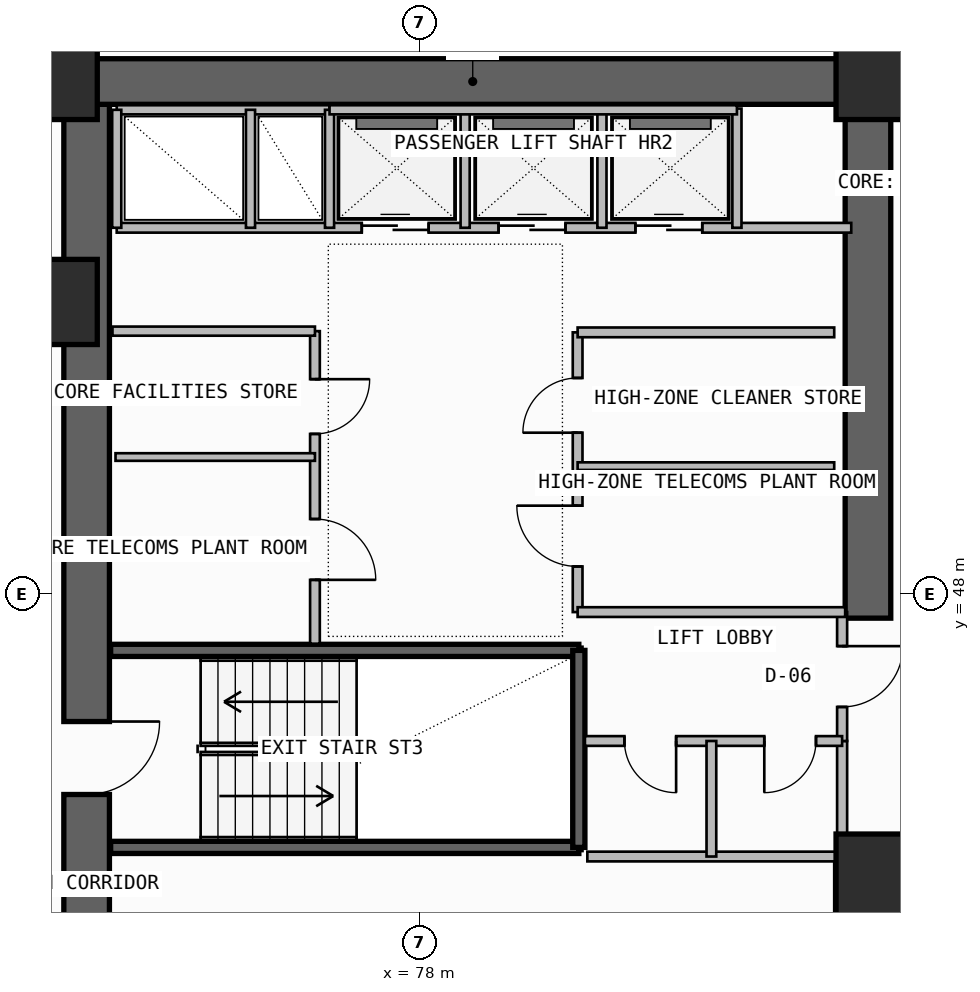
"""IFC4 building model, lengths in metres.
Left out: names, types, materials, properties, quantities, classifications, styles, units other than length and angle.
Written with IfcOpenShell. Run it as: python <this file> out.ifc"""

import sys

from ifc_helpers import new_model, si_unit, direction, frame, frame_2d, origin, origin_2d, place, context, subcontext, project, spatial, rectangle, extrude, element, fill, save


model = new_model("IFC4")
c1 = context("Model", 3, precision=1e-05, world=origin(), true_north=direction((0.0, 1.0)))
c2 = subcontext(c1, "Body", "Model", "MODEL_VIEW")
j1 = project(units=[si_unit("LENGTHUNIT", "METRE"), si_unit("PLANEANGLEUNIT", "RADIAN")], contexts=[c1])
p1 = place(None, origin())
s1 = spatial("IfcSite", under=j1, at=p1, CompositionType="ELEMENT")
p2 = place(p1, origin())
s2 = spatial("IfcBuilding", under=s1, at=p2, CompositionType="ELEMENT")
p3 = place(p2, frame((0.0, 0.0, 218.5)))
s3 = spatial("IfcBuildingStorey", under=s2, at=p3, CompositionType="ELEMENT", Elevation=218.5)
p4 = place(p3, frame((72.525, 35.5, -0.26), z_axis=(0.0, 0.0, 1.0), x_axis=(0.0, 1.0, 0.0)))
e1 = element("IfcWall", 1, at=p4, inside=s3, PredefinedType="SHEAR", context=c2, shape_type="SweptSolid", body=[
    extrude(rectangle(XDim=7.85, YDim=0.75, at=frame_2d((3.925, 0.0))), origin(), (0.0, 0.0, 1.0), 3.52),
])
p5 = place(p4, frame((1.45, 0.0, 0.26)))
e2 = element("IfcOpeningElement", 2, at=p5, cuts=e1, PredefinedType="OPENING", context=c2, shape_type="SweptSolid", body=[
    extrude(rectangle(XDim=1.2, YDim=2.2, at=frame_2d((0.6, 1.1))), frame((0.0, 0.385, 0.0), z_axis=(0.0, -1.0, 0.0), x_axis=(1.0, 0.0, 0.0)), (0.0, 0.0, 1.0), 0.77),
])
p6 = place(p3, frame((72.525, 43.35, -0.26), z_axis=(0.0, 0.0, 1.0), x_axis=(0.0, 1.0, 0.0)))
e3 = element("IfcWall", 3, at=p6, inside=s3, PredefinedType="SHEAR", context=c2, shape_type="SweptSolid", body=[
    extrude(rectangle(XDim=12.7, YDim=0.75, at=frame_2d((6.35, 0.0))), origin(), (0.0, 0.0, 1.0), 3.52),
])
p7 = place(p6, frame((1.35, 0.0, 0.26)))
e4 = element("IfcOpeningElement", 4, at=p7, cuts=e3, PredefinedType="OPENING", context=c2, shape_type="SweptSolid", body=[
    extrude(rectangle(XDim=1.2, YDim=2.2, at=frame_2d((0.6, 1.1))), frame((0.0, 0.385, 0.0), z_axis=(0.0, -1.0, 0.0), x_axis=(1.0, 0.0, 0.0)), (0.0, 0.0, 1.0), 0.77),
])
p8 = place(p3, frame((72.0, 56.425, -0.26), z_axis=(0.0, 0.0, 1.0), x_axis=(1.0, 0.0, 0.0)))
e5 = element("IfcWall", 5, at=p8, inside=s3, PredefinedType="SHEAR", context=c2, shape_type="SweptSolid", body=[
    extrude(rectangle(XDim=13.75, YDim=0.75, at=frame_2d((6.875, 0.0))), origin(), (0.0, 0.0, 1.0), 3.52),
])
p9 = place(p3, frame((85.375, 47.6, -0.26), z_axis=(0.0, 0.0, 1.0), x_axis=(0.0, 1.0, 0.0)))
e6 = element("IfcWall", 6, at=p9, inside=s3, PredefinedType="SHEAR", context=c2, shape_type="SweptSolid", body=[
    extrude(rectangle(XDim=8.45, YDim=0.75, at=frame_2d((4.225, 0.0))), origin(), (0.0, 0.0, 1.0), 3.52),
])
for number, where, z_axis, x_axis in (
    (7, (85.55, 43.35, 0.0), (0.0, 0.0, 1.0), (1.0, 0.0, 0.0)),
    (8, (72.0, 52.8, 0.0), (0.0, 0.0, 1.0), (1.0, 0.0, 0.0)),
    (9, (72.0, 56.5, 0.0), (0.0, 0.0, 1.0), (1.0, 0.0, 0.0)),
    (10, (85.55, 56.5, 0.0), (0.0, 0.0, 1.0), (1.0, 0.0, 0.0)),
):
    element("IfcColumn", number, at=place(p3, frame(where, z_axis=z_axis, x_axis=x_axis)), inside=s3, PredefinedType="COLUMN", context=c2, shape_type="SweptSolid", body=[
        extrude(rectangle(XDim=1.4, YDim=1.4, at=origin_2d()), origin(), (0.0, 0.0, 1.0), 3.52),
    ])
p10 = place(p3, frame((116.396, 56.722, 0.0), z_axis=(0.0, 0.0, 1.0), x_axis=(-0.977936620644, 0.208901809478, 0.0)))
e11 = element("IfcWall", 11, at=p10, inside=s3, PredefinedType="PARAPET", context=c2, shape_type="SweptSolid", body=[
    extrude(rectangle(XDim=31.685, YDim=0.2, at=frame_2d((15.843, 0.0))), origin(), (0.0, 0.0, 1.0), 1.15),
])
p11 = place(p3, frame((84.92, 38.85, 0.0), z_axis=(0.0, 0.0, 1.0), x_axis=(0.0, 1.0, 0.0)))
e12 = element("IfcWall", 12, at=p11, inside=s3, PredefinedType="SOLIDWALL", context=c2, shape_type="SweptSolid", body=[
    extrude(rectangle(XDim=4.83, YDim=0.2, at=frame_2d((2.415, 0.0))), origin(), (0.0, 0.0, 1.0), 3.26),
])
p12 = place(p11, frame((1.25, 0.0, 0.0)))
e13 = element("IfcOpeningElement", 13, at=p12, cuts=e12, PredefinedType="OPENING", context=c2, shape_type="SweptSolid", body=[
    extrude(rectangle(XDim=1.1, YDim=2.2, at=frame_2d((0.55, 1.1))), frame((0.0, 0.11, 0.0), z_axis=(0.0, -1.0, 0.0), x_axis=(1.0, 0.0, 0.0)), (0.0, 0.0, 1.0), 0.22),
])
for number, where, z_axis, x_axis in (
    (14, (72.92, 43.83, -0.26), (0.0, 0.0, 1.0), (1.0, 0.0, 0.0)),
    (15, (72.92, 47.07, -0.26), (0.0, 0.0, 1.0), (1.0, 0.0, 0.0)),
):
    element("IfcWall", number, at=place(p3, frame(where, z_axis=z_axis, x_axis=x_axis)), inside=s3, PredefinedType="SOLIDWALL", context=c2, shape_type="SweptSolid", body=[
        extrude(rectangle(XDim=7.7, YDim=0.2, at=frame_2d((3.85, 0.0))), origin(), (0.0, 0.0, 1.0), 3.52),
    ])
p13 = place(p3, frame((80.62, 43.83, -0.26), z_axis=(0.0, 0.0, 1.0), x_axis=(0.0, 1.0, 0.0)))
e16 = element("IfcWall", 16, at=p13, inside=s3, PredefinedType="SOLIDWALL", context=c2, shape_type="SweptSolid", body=[
    extrude(rectangle(XDim=3.24, YDim=0.2, at=frame_2d((1.62, 0.0))), origin(), (0.0, 0.0, 1.0), 3.52),
])
p14 = place(p3, frame((84.95, 43.68, 0.0), z_axis=(0.0, 0.0, 1.0), x_axis=(0.0, 1.0, 0.0)))
e17 = element("IfcWall", 17, at=p14, inside=s3, PredefinedType="PLUMBINGWALL", context=c2, shape_type="SweptSolid", body=[
    extrude(rectangle(XDim=1.9, YDim=0.165, at=frame_2d((0.95, 0.0))), origin(), (0.0, 0.0, 1.0), 3.26),
])
p15 = place(p3, frame((84.95, 45.58, 0.0), z_axis=(0.0, 0.0, 1.0), x_axis=(0.0, 1.0, 0.0)))
e18 = element("IfcWall", 18, at=p15, inside=s3, PredefinedType="PARTITIONING", context=c2, shape_type="SweptSolid", body=[
    extrude(rectangle(XDim=2.12, YDim=0.165, at=frame_2d((1.06, 0.0))), origin(), (0.0, 0.0, 1.0), 3.26),
])
p16 = place(p15, frame((0.56, 0.0, 0.0)))
e19 = element("IfcOpeningElement", 19, at=p16, cuts=e18, PredefinedType="OPENING", context=c2, shape_type="SweptSolid", body=[
    extrude(rectangle(XDim=1.0, YDim=2.2, at=frame_2d((0.5, 1.1))), frame((0.0, 0.093, 0.0), z_axis=(0.0, -1.0, 0.0), x_axis=(1.0, 0.0, 0.0)), (0.0, 0.0, 1.0), 0.185),
])
p17 = place(p3, frame((80.72, 45.58, 0.0), z_axis=(0.0, 0.0, 1.0), x_axis=(1.0, 0.0, 0.0)))
e20 = element("IfcWall", 20, at=p17, inside=s3, PredefinedType="PLUMBINGWALL", context=c2, shape_type="SweptSolid", body=[
    extrude(rectangle(XDim=4.23, YDim=0.16, at=frame_2d((2.115, 0.0))), origin(), (0.0, 0.0, 1.0), 3.26),
])
p18 = place(p17, frame((0.65, 0.0, 0.0)))
e21 = element("IfcOpeningElement", 21, at=p18, cuts=e20, PredefinedType="OPENING", context=c2, shape_type="SweptSolid", body=[
    extrude(rectangle(XDim=0.85, YDim=2.05, at=frame_2d((0.425, 1.025))), frame((0.0, 0.09, 0.0), z_axis=(0.0, -1.0, 0.0), x_axis=(1.0, 0.0, 0.0)), (0.0, 0.0, 1.0), 0.18),
])
p19 = place(p17, frame((2.95, 0.0, 0.0)))
e22 = element("IfcOpeningElement", 22, at=p19, cuts=e20, PredefinedType="OPENING", context=c2, shape_type="SweptSolid", body=[
    extrude(rectangle(XDim=0.85, YDim=2.05, at=frame_2d((0.425, 1.025))), frame((0.0, 0.09, 0.0), z_axis=(0.0, -1.0, 0.0), x_axis=(1.0, 0.0, 0.0)), (0.0, 0.0, 1.0), 0.18),
])
p20 = place(p3, frame((80.76, 43.68, 0.0), z_axis=(0.0, 0.0, 1.0), x_axis=(1.0, 0.0, 0.0)))
e23 = element("IfcWall", 23, at=p20, inside=s3, PredefinedType="PLUMBINGWALL", context=c2, shape_type="SweptSolid", body=[
    extrude(rectangle(XDim=4.19, YDim=0.16, at=frame_2d((2.095, 0.0))), origin(), (0.0, 0.0, 1.0), 3.26),
])
p21 = place(p3, frame((82.8, 43.68, 0.0), z_axis=(0.0, 0.0, 1.0), x_axis=(0.0, 1.0, 0.0)))
e24 = element("IfcWall", 24, at=p21, inside=s3, PredefinedType="PLUMBINGWALL", context=c2, shape_type="SweptSolid", body=[
    extrude(rectangle(XDim=1.9, YDim=0.16, at=frame_2d((0.95, 0.0))), origin(), (0.0, 0.0, 1.0), 3.26),
])
p22 = place(p3, frame((76.28, 47.18, 0.0), z_axis=(0.0, 0.0, 1.0), x_axis=(0.0, 1.0, 0.0)))
e25 = element("IfcWall", 25, at=p22, inside=s3, PredefinedType="SOLIDWALL", context=c2, shape_type="SweptSolid", body=[
    extrude(rectangle(XDim=5.14, YDim=0.16, at=frame_2d((2.57, 0.0))), origin(), (0.0, 0.0, 1.0), 3.26),
])
p23 = place(p22, frame((1.05, 0.0, 0.0)))
e26 = element("IfcOpeningElement", 26, at=p23, cuts=e25, PredefinedType="OPENING", context=c2, shape_type="SweptSolid", body=[
    extrude(rectangle(XDim=1.0, YDim=2.2, at=frame_2d((0.5, 1.1))), frame((0.0, 0.09, 0.0), z_axis=(0.0, -1.0, 0.0), x_axis=(1.0, 0.0, 0.0)), (0.0, 0.0, 1.0), 0.18),
])
p24 = place(p22, frame((3.45, 0.0, 0.0)))
e27 = element("IfcOpeningElement", 27, at=p24, cuts=e25, PredefinedType="OPENING", context=c2, shape_type="SweptSolid", body=[
    extrude(rectangle(XDim=0.9, YDim=2.1, at=frame_2d((0.45, 1.05))), frame((0.0, 0.09, 0.0), z_axis=(0.0, -1.0, 0.0), x_axis=(1.0, 0.0, 0.0)), (0.0, 0.0, 1.0), 0.18),
])
p25 = place(p3, frame((72.95, 52.32, 0.0), z_axis=(0.0, 0.0, 1.0), x_axis=(1.0, 0.0, 0.0)))
e28 = element("IfcWall", 28, at=p25, inside=s3, PredefinedType="SOLIDWALL", context=c2, shape_type="SweptSolid", body=[
    extrude(rectangle(XDim=3.33, YDim=0.15, at=frame_2d((1.665, 0.0))), origin(), (0.0, 0.0, 1.0), 3.26),
])
p26 = place(p3, frame((73.0, 50.25, 0.0), z_axis=(0.0, 0.0, 1.0), x_axis=(1.0, 0.0, 0.0)))
e29 = element("IfcWall", 29, at=p26, inside=s3, PredefinedType="PARTITIONING", context=c2, shape_type="SweptSolid", body=[
    extrude(rectangle(XDim=3.28, YDim=0.125, at=frame_2d((1.64, 0.0))), origin(), (0.0, 0.0, 1.0), 3.26),
])
p27 = place(p3, frame((80.6, 47.7, 0.0), z_axis=(0.0, 0.0, 1.0), x_axis=(0.0, 1.0, 0.0)))
e30 = element("IfcWall", 30, at=p27, inside=s3, PredefinedType="SOLIDWALL", context=c2, shape_type="SweptSolid", body=[
    extrude(rectangle(XDim=4.6, YDim=0.16, at=frame_2d((2.3, 0.0))), origin(), (0.0, 0.0, 1.0), 3.26),
])
p28 = place(p27, frame((0.75, 0.0, 0.0)))
e31 = element("IfcOpeningElement", 31, at=p28, cuts=e30, PredefinedType="OPENING", context=c2, shape_type="SweptSolid", body=[
    extrude(rectangle(XDim=1.0, YDim=2.2, at=frame_2d((0.5, 1.1))), frame((0.0, 0.09, 0.0), z_axis=(0.0, -1.0, 0.0), x_axis=(1.0, 0.0, 0.0)), (0.0, 0.0, 1.0), 0.18),
])
p29 = place(p27, frame((2.95, 0.0, 0.0)))
e32 = element("IfcOpeningElement", 32, at=p29, cuts=e30, PredefinedType="OPENING", context=c2, shape_type="SweptSolid", body=[
    extrude(rectangle(XDim=0.9, YDim=2.1, at=frame_2d((0.45, 1.05))), frame((0.0, 0.09, 0.0), z_axis=(0.0, -1.0, 0.0), x_axis=(1.0, 0.0, 0.0)), (0.0, 0.0, 1.0), 0.18),
])
p30 = place(p3, frame((80.6, 47.7, 0.0), z_axis=(0.0, 0.0, 1.0), x_axis=(1.0, 0.0, 0.0)))
e33 = element("IfcWall", 33, at=p30, inside=s3, PredefinedType="SOLIDWALL", context=c2, shape_type="SweptSolid", body=[
    extrude(rectangle(XDim=4.4, YDim=0.16, at=frame_2d((2.2, 0.0))), origin(), (0.0, 0.0, 1.0), 3.26),
])
p31 = place(p3, frame((80.6, 52.3, 0.0), z_axis=(0.0, 0.0, 1.0), x_axis=(1.0, 0.0, 0.0)))
e34 = element("IfcWall", 34, at=p31, inside=s3, PredefinedType="SOLIDWALL", context=c2, shape_type="SweptSolid", body=[
    extrude(rectangle(XDim=4.22, YDim=0.16, at=frame_2d((2.11, 0.0))), origin(), (0.0, 0.0, 1.0), 3.26),
])
p32 = place(p3, frame((80.6, 50.1, 0.0), z_axis=(0.0, 0.0, 1.0), x_axis=(1.0, 0.0, 0.0)))
e35 = element("IfcWall", 35, at=p32, inside=s3, PredefinedType="PARTITIONING", context=c2, shape_type="SweptSolid", body=[
    extrude(rectangle(XDim=4.22, YDim=0.125, at=frame_2d((2.11, 0.0))), origin(), (0.0, 0.0, 1.0), 3.26),
])
p33 = place(p3, frame((73.02, 54.02, 0.0), z_axis=(0.0, 0.0, 1.0), x_axis=(1.0, 0.0, 0.0)))
e36 = element("IfcWall", 36, at=p33, inside=s3, PredefinedType="SOLIDWALL", context=c2, shape_type="SweptSolid", body=[
    extrude(rectangle(XDim=12.08, YDim=0.16, at=frame_2d((6.04, 0.0))), origin(), (0.0, 0.0, 1.0), 3.26),
])
p34 = place(p33, frame((4.03, 0.0, 0.0)))
e37 = element("IfcOpeningElement", 37, at=p34, cuts=e36, PredefinedType="OPENING", context=c2, shape_type="SweptSolid", body=[
    extrude(rectangle(XDim=1.1, YDim=2.25, at=frame_2d((0.55, 1.125))), frame((0.0, 0.09, 0.0), z_axis=(0.0, -1.0, 0.0), x_axis=(1.0, 0.0, 0.0)), (0.0, 0.0, 1.0), 0.18),
])
p35 = place(p33, frame((6.28, 0.0, 0.0)))
e38 = element("IfcOpeningElement", 38, at=p35, cuts=e36, PredefinedType="OPENING", context=c2, shape_type="SweptSolid", body=[
    extrude(rectangle(XDim=1.1, YDim=2.25, at=frame_2d((0.55, 1.125))), frame((0.0, 0.09, 0.0), z_axis=(0.0, -1.0, 0.0), x_axis=(1.0, 0.0, 0.0)), (0.0, 0.0, 1.0), 0.18),
])
p36 = place(p33, frame((8.53, 0.0, 0.0)))
e39 = element("IfcOpeningElement", 39, at=p36, cuts=e36, PredefinedType="OPENING", context=c2, shape_type="SweptSolid", body=[
    extrude(rectangle(XDim=1.1, YDim=2.25, at=frame_2d((0.55, 1.125))), frame((0.0, 0.09, 0.0), z_axis=(0.0, -1.0, 0.0), x_axis=(1.0, 0.0, 0.0)), (0.0, 0.0, 1.0), 0.18),
])
p37 = place(p3, frame((73.02, 55.96, 0.0), z_axis=(0.0, 0.0, 1.0), x_axis=(1.0, 0.0, 0.0)))
e40 = element("IfcWall", 40, at=p37, inside=s3, PredefinedType="SOLIDWALL", context=c2, shape_type="SweptSolid", body=[
    extrude(rectangle(XDim=3.5, YDim=0.15, at=frame_2d((1.75, 0.0))), origin(), (0.0, 0.0, 1.0), 3.26),
])
p38 = place(p3, frame((73.02, 54.02, 0.0), z_axis=(0.0, 0.0, 1.0), x_axis=(0.0, 1.0, 0.0)))
e41 = element("IfcWall", 41, at=p38, inside=s3, PredefinedType="PLUMBINGWALL", context=c2, shape_type="SweptSolid", body=[
    extrude(rectangle(XDim=1.94, YDim=0.15, at=frame_2d((0.97, 0.0))), origin(), (0.0, 0.0, 1.0), 3.26),
])
p39 = place(p3, frame((76.52, 54.02, 0.0), z_axis=(0.0, 0.0, 1.0), x_axis=(0.0, 1.0, 0.0)))
e42 = element("IfcWall", 42, at=p39, inside=s3, PredefinedType="SOLIDWALL", context=c2, shape_type="SweptSolid", body=[
    extrude(rectangle(XDim=1.94, YDim=0.15, at=frame_2d((0.97, 0.0))), origin(), (0.0, 0.0, 1.0), 3.26),
])
p40 = place(p3, frame((75.22, 54.02, 0.0), z_axis=(0.0, 0.0, 1.0), x_axis=(0.0, 1.0, 0.0)))
e43 = element("IfcWall", 43, at=p40, inside=s3, PredefinedType="PLUMBINGWALL", context=c2, shape_type="SweptSolid", body=[
    extrude(rectangle(XDim=1.94, YDim=0.15, at=frame_2d((0.97, 0.0))), origin(), (0.0, 0.0, 1.0), 3.26),
])
for number, where, z_axis, x_axis in (
    (44, (78.75, 54.02, 0.0), (0.0, 0.0, 1.0), (0.0, 1.0, 0.0)),
    (45, (81.0, 54.02, 0.0), (0.0, 0.0, 1.0), (0.0, 1.0, 0.0)),
):
    element("IfcWall", number, at=place(p3, frame(where, z_axis=z_axis, x_axis=x_axis)), inside=s3, PredefinedType="PLUMBINGWALL", context=c2, shape_type="SweptSolid", body=[
        extrude(rectangle(XDim=1.96, YDim=0.15, at=frame_2d((0.98, 0.0))), origin(), (0.0, 0.0, 1.0), 3.26),
    ])
p41 = place(p3, frame((83.22, 54.02, 0.0), z_axis=(0.0, 0.0, 1.0), x_axis=(0.0, 1.0, 0.0)))
e46 = element("IfcWall", 46, at=p41, inside=s3, PredefinedType="SOLIDWALL", context=c2, shape_type="SweptSolid", body=[
    extrude(rectangle(XDim=1.96, YDim=0.15, at=frame_2d((0.98, 0.0))), origin(), (0.0, 0.0, 1.0), 3.26),
])
p42 = place(p3, frame((76.52, 55.96, 0.0), z_axis=(0.0, 0.0, 1.0), x_axis=(1.0, 0.0, 0.0)))
e47 = element("IfcWall", 47, at=p42, inside=s3, PredefinedType="SOLIDWALL", context=c2, shape_type="SweptSolid", body=[
    extrude(rectangle(XDim=6.7, YDim=0.15, at=frame_2d((3.35, 0.0))), origin(), (0.0, 0.0, 1.0), 3.26),
])
p43 = place(p7, frame((1.2, 0.0, 0.0), z_axis=(0.0, 0.0, 1.0), x_axis=(-1.0, 0.0, 0.0)))
e48 = element("IfcDoor", 48, at=p43, inside=s3, OperationType="SINGLE_SWING_LEFT", PredefinedType="USERDEFINED", context=c2, shape_type="SweptSolid", body=[
    extrude(rectangle(XDim=1.2, YDim=2.2, at=frame_2d((0.6, 1.1))), frame((0.0, 0.025, 0.0), z_axis=(0.0, -1.0, 0.0), x_axis=(1.0, 0.0, 0.0)), (0.0, 0.0, 1.0), 0.05),
])
fill(e4, e48)
p44 = place(p16, frame((1.0, 0.0, 0.0), z_axis=(0.0, 0.0, 1.0), x_axis=(-1.0, 0.0, 0.0)))
e49 = element("IfcDoor", 49, at=p44, inside=s3, OperationType="SINGLE_SWING_LEFT", PredefinedType="DOOR", context=c2, shape_type="SweptSolid", body=[
    extrude(rectangle(XDim=1.0, YDim=2.2, at=frame_2d((0.5, 1.1))), frame((0.0, 0.025, 0.0), z_axis=(0.0, -1.0, 0.0), x_axis=(1.0, 0.0, 0.0)), (0.0, 0.0, 1.0), 0.05),
])
fill(e19, e49)
p45 = place(p18, frame((0.85, 0.0, 0.0), z_axis=(0.0, 0.0, 1.0), x_axis=(-1.0, 0.0, 0.0)))
e50 = element("IfcDoor", 50, at=p45, inside=s3, OperationType="SINGLE_SWING_LEFT", PredefinedType="DOOR", context=c2, shape_type="SweptSolid", body=[
    extrude(rectangle(XDim=0.85, YDim=2.05, at=frame_2d((0.425, 1.025))), frame((0.0, 0.025, 0.0), z_axis=(0.0, -1.0, 0.0), x_axis=(1.0, 0.0, 0.0)), (0.0, 0.0, 1.0), 0.05),
])
fill(e21, e50)
p46 = place(p19, frame((0.85, 0.0, 0.0), z_axis=(0.0, 0.0, 1.0), x_axis=(-1.0, 0.0, 0.0)))
e51 = element("IfcDoor", 51, at=p46, inside=s3, OperationType="SINGLE_SWING_RIGHT", PredefinedType="DOOR", context=c2, shape_type="SweptSolid", body=[
    extrude(rectangle(XDim=0.85, YDim=2.05, at=frame_2d((0.425, 1.025))), frame((0.0, 0.025, 0.0), z_axis=(0.0, -1.0, 0.0), x_axis=(1.0, 0.0, 0.0)), (0.0, 0.0, 1.0), 0.05),
])
fill(e22, e51)
p47 = place(p23, frame((1.0, 0.0, 0.0), z_axis=(0.0, 0.0, 1.0), x_axis=(-1.0, 0.0, 0.0)))
e52 = element("IfcDoor", 52, at=p47, inside=s3, OperationType="SINGLE_SWING_RIGHT", PredefinedType="DOOR", context=c2, shape_type="SweptSolid", body=[
    extrude(rectangle(XDim=1.0, YDim=2.2, at=frame_2d((0.5, 1.1))), frame((0.0, 0.025, 0.0), z_axis=(0.0, -1.0, 0.0), x_axis=(1.0, 0.0, 0.0)), (0.0, 0.0, 1.0), 0.05),
])
fill(e26, e52)
p48 = place(p24, frame((0.9, 0.0, 0.0), z_axis=(0.0, 0.0, 1.0), x_axis=(-1.0, 0.0, 0.0)))
e53 = element("IfcDoor", 53, at=p48, inside=s3, OperationType="SINGLE_SWING_LEFT", PredefinedType="DOOR", context=c2, shape_type="SweptSolid", body=[
    extrude(rectangle(XDim=0.9, YDim=2.1, at=frame_2d((0.45, 1.05))), frame((0.0, 0.025, 0.0), z_axis=(0.0, -1.0, 0.0), x_axis=(1.0, 0.0, 0.0)), (0.0, 0.0, 1.0), 0.05),
])
fill(e27, e53)
p49 = place(p28, origin())
e54 = element("IfcDoor", 54, at=p49, inside=s3, OperationType="SINGLE_SWING_RIGHT", PredefinedType="DOOR", context=c2, shape_type="SweptSolid", body=[
    extrude(rectangle(XDim=1.0, YDim=2.2, at=frame_2d((0.5, 1.1))), frame((0.0, 0.025, 0.0), z_axis=(0.0, -1.0, 0.0), x_axis=(1.0, 0.0, 0.0)), (0.0, 0.0, 1.0), 0.05),
])
fill(e31, e54)
p50 = place(p29, origin())
e55 = element("IfcDoor", 55, at=p50, inside=s3, OperationType="SINGLE_SWING_LEFT", PredefinedType="DOOR", context=c2, shape_type="SweptSolid", body=[
    extrude(rectangle(XDim=0.9, YDim=2.1, at=frame_2d((0.45, 1.05))), frame((0.0, 0.025, 0.0), z_axis=(0.0, -1.0, 0.0), x_axis=(1.0, 0.0, 0.0)), (0.0, 0.0, 1.0), 0.05),
])
fill(e32, e55)
p51 = place(p34, origin())
e56 = element("IfcDoor", 56, at=p51, inside=s3, OperationType="DOUBLE_DOOR_SLIDING", PredefinedType="DOOR", context=c2, shape_type="SweptSolid", body=[
    extrude(rectangle(XDim=1.1, YDim=2.25, at=frame_2d((0.55, 1.125))), frame((0.0, 0.025, 0.0), z_axis=(0.0, -1.0, 0.0), x_axis=(1.0, 0.0, 0.0)), (0.0, 0.0, 1.0), 0.05),
])
fill(e37, e56)
p52 = place(p35, origin())
e57 = element("IfcDoor", 57, at=p52, inside=s3, OperationType="DOUBLE_DOOR_SLIDING", PredefinedType="DOOR", context=c2, shape_type="SweptSolid", body=[
    extrude(rectangle(XDim=1.1, YDim=2.25, at=frame_2d((0.55, 1.125))), frame((0.0, 0.025, 0.0), z_axis=(0.0, -1.0, 0.0), x_axis=(1.0, 0.0, 0.0)), (0.0, 0.0, 1.0), 0.05),
])
fill(e38, e57)
p53 = place(p36, origin())
e58 = element("IfcDoor", 58, at=p53, inside=s3, OperationType="DOUBLE_DOOR_SLIDING", PredefinedType="DOOR", context=c2, shape_type="SweptSolid", body=[
    extrude(rectangle(XDim=1.1, YDim=2.25, at=frame_2d((0.55, 1.125))), frame((0.0, 0.025, 0.0), z_axis=(0.0, -1.0, 0.0), x_axis=(1.0, 0.0, 0.0)), (0.0, 0.0, 1.0), 0.05),
])
fill(e39, e58)
save(model, sys.argv[1])
